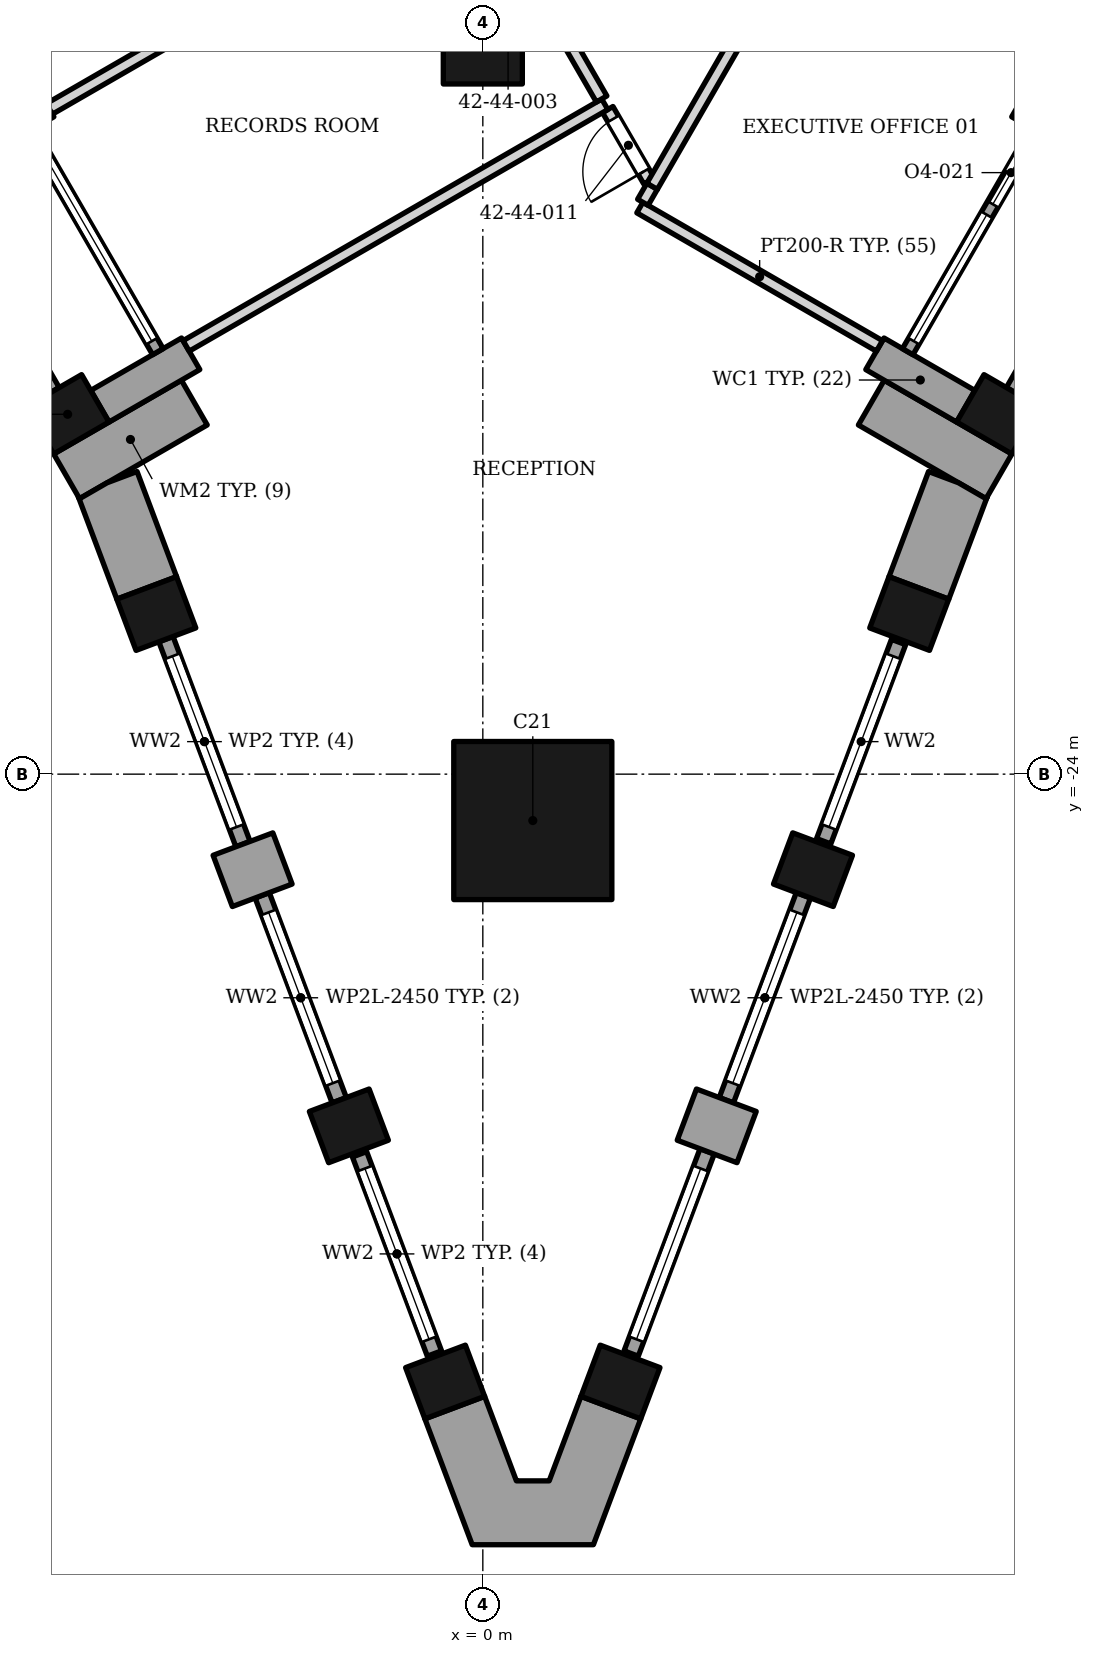
"""IFC4 building model, lengths in metres.
Left out: names, types, materials, properties, quantities, classifications, styles, units other than length and angle.
Written with IfcOpenShell. Run it as: python <this file> out.ifc"""

import sys

from ifc_helpers import new_model, si_unit, direction, frame, frame_2d, origin, origin_2d, place, context, subcontext, project, spatial, polyline, rectangle, outline, extrude, element, fill, save


model = new_model("IFC4")
c1 = context("Model", 3, precision=1e-05, world=origin(), true_north=direction((0.0, 1.0)))
c2 = subcontext(c1, "Body", "Model", "MODEL_VIEW")
j1 = project(units=[si_unit("LENGTHUNIT", "METRE"), si_unit("PLANEANGLEUNIT", "RADIAN")], contexts=[c1])
p1 = place(None, origin())
s1 = spatial("IfcSite", under=j1, at=p1, CompositionType="ELEMENT")
p2 = place(p1, origin())
s2 = spatial("IfcBuilding", under=s1, at=p2, CompositionType="ELEMENT")
p3 = place(p2, frame((0.0, 0.0, 179.7)))
s3 = spatial("IfcBuildingStorey", under=s2, at=p3, CompositionType="ELEMENT", Elevation=179.7)
p4 = place(p3, frame((0.822, -24.763, 0.0), z_axis=(0.0, 0.0, 1.0), x_axis=(0.0, 1.0, 0.0)))
e1 = element("IfcColumn", 1, at=p4, inside=s3, PredefinedType="COLUMN", context=c2, shape_type="SweptSolid", body=[
    extrude(rectangle(XDim=2.6, YDim=2.6, at=origin_2d()), origin(), (0.0, 0.0, 1.0), 3.9),
])
p5 = place(p3, frame((0.0, -12.0, 0.0), z_axis=(0.0, 0.0, 1.0), x_axis=(1.0, 0.0, 0.0)))
e2 = element("IfcColumn", 2, at=p5, inside=s3, PredefinedType="COLUMN", context=c2, shape_type="SweptSolid", body=[
    extrude(rectangle(XDim=1.3, YDim=1.3, at=origin_2d()), origin(), (0.0, 0.0, 1.0), 3.9),
])
for number, where, z_axis, x_axis in (
    (3, (-6.828, -18.082, 0.0), (0.0, 0.0, 1.0), (0.5, -0.866, 0.0)),
    (4, (-5.37, -21.359, 0.0), (0.0, 0.0, 1.0), (0.352, -0.936, 0.0)),
    (5, (-2.203, -29.784, 0.0), (0.0, 0.0, 1.0), (0.352, -0.936, 0.0)),
    (6, (-0.62, -33.996, 0.0), (0.0, 0.0, 1.0), (0.352, -0.936, 0.0)),
    (7, (2.264, -33.996, 0.0), (0.0, 0.0, 1.0), (0.352, 0.936, 0.0)),
    (8, (5.43, -25.571, 0.0), (0.0, 0.0, 1.0), (0.352, 0.936, 0.0)),
    (9, (7.013, -21.359, 0.0), (0.0, 0.0, 1.0), (0.352, 0.936, 0.0)),
    (10, (8.472, -18.082, 0.0), (0.0, 0.0, 1.0), (0.5, 0.866, 0.0)),
):
    element("IfcColumn", number, at=place(p3, frame(where, z_axis=z_axis, x_axis=x_axis)), inside=s3, PredefinedType="COLUMN", context=c2, shape_type="SweptSolid", body=[
        extrude(rectangle(XDim=0.9, YDim=1.05, at=origin_2d()), origin(), (0.0, 0.0, 1.0), 3.9),
    ])
p6 = place(p3, frame((-8.623, -13.923, 0.0), z_axis=(0.0, 0.0, 1.0), x_axis=(0.866013532718, 0.500020560727, 0.0)))
e11 = element("IfcWall", 11, at=p6, inside=s3, PredefinedType="SOLIDWALL", context=c2, shape_type="SweptSolid", body=[
    extrude(rectangle(XDim=1.725, YDim=0.3, at=frame_2d((0.863, 0.0))), origin(), (0.0, 0.0, 1.0), 3.0),
])
p7 = place(p3, frame((-4.804, -17.087, 0.0), z_axis=(0.0, 0.0, 1.0), x_axis=(-0.866013532718, -0.500020560727, 0.0)))
e12 = element("IfcWall", 12, at=p7, inside=s3, PredefinedType="SOLIDWALL", context=c2, shape_type="SweptSolid", body=[
    extrude(rectangle(XDim=1.725, YDim=0.6, at=frame_2d((0.863, 0.0))), origin(), (0.0, 0.0, 1.0), 3.0),
])
p8 = place(p3, frame((-8.853, -14.575, 0.0), z_axis=(0.0, 0.0, 1.0), x_axis=(0.500012057535, -0.866018442252, 0.0)))
e13 = element("IfcWall", 13, at=p8, inside=s3, PredefinedType="SOLIDWALL", context=c2, shape_type="SweptSolid", body=[
    extrude(rectangle(XDim=3.6, YDim=0.2, at=frame_2d((1.8, 0.0))), origin(), (0.0, 0.0, 1.0), 3.0),
])
p9 = place(p3, frame((-7.444, -13.415, 0.0), z_axis=(0.0, 0.0, 1.0), x_axis=(0.49998411664, -0.866034573852, 0.0)))
e14 = element("IfcWall", 14, at=p9, inside=s3, PredefinedType="ELEMENTEDWALL", context=c2, shape_type="SweptSolid", body=[
    extrude(rectangle(XDim=4.2, YDim=0.2, at=frame_2d((2.1, 0.0))), origin(), (0.0, 0.0, 1.0), 3.0),
])
p10 = place(p9, frame((0.2, 0.0, 0.45)))
e15 = element("IfcOpeningElement", 15, at=p10, cuts=e14, PredefinedType="OPENING", context=c2, shape_type="SweptSolid", body=[
    extrude(rectangle(XDim=3.8, YDim=2.25, at=frame_2d((1.9, 1.125))), frame((0.0, 0.11, 0.0), z_axis=(0.0, -1.0, 0.0), x_axis=(1.0, 0.0, 0.0)), (0.0, 0.0, 1.0), 0.22),
])
p11 = place(p3, frame((7.942, -17.95, 0.0), z_axis=(0.0, 0.0, 1.0), x_axis=(-0.866013532718, 0.500020560727, 0.0)))
e16 = element("IfcWall", 16, at=p11, inside=s3, PredefinedType="SOLIDWALL", context=c2, shape_type="SweptSolid", body=[
    extrude(rectangle(XDim=1.725, YDim=0.6, at=frame_2d((0.863, 0.0))), origin(), (0.0, 0.0, 1.0), 3.0),
])
p12 = place(p3, frame((10.267, -13.923, 0.0), z_axis=(0.0, 0.0, 1.0), x_axis=(-0.866013532718, 0.500020560727, 0.0)))
e17 = element("IfcWall", 17, at=p12, inside=s3, PredefinedType="SOLIDWALL", context=c2, shape_type="SweptSolid", body=[
    extrude(rectangle(XDim=1.725, YDim=0.3, at=frame_2d((0.863, 0.0))), origin(), (0.0, 0.0, 1.0), 3.0),
])
p13 = place(p3, frame((8.697, -17.693, 0.0), z_axis=(0.0, 0.0, 1.0), x_axis=(0.499961193289, 0.866047807691, 0.0)))
e18 = element("IfcWall", 18, at=p13, inside=s3, PredefinedType="SOLIDWALL", context=c2, shape_type="SweptSolid", body=[
    extrude(rectangle(XDim=3.6, YDim=0.2, at=frame_2d((1.8, 0.0))), origin(), (0.0, 0.0, 1.0), 3.0),
])
p14 = place(p3, frame((6.988, -17.052, 0.0), z_axis=(0.0, 0.0, 1.0), x_axis=(0.500027713859, 0.866009402589, 0.0)))
e19 = element("IfcWall", 19, at=p14, inside=s3, PredefinedType="ELEMENTEDWALL", context=c2, shape_type="SweptSolid", body=[
    extrude(rectangle(XDim=4.2, YDim=0.2, at=frame_2d((2.1, 0.0))), origin(), (0.0, 0.0, 1.0), 3.0),
])
p15 = place(p14, frame((0.2, 0.0, 0.45)))
e20 = element("IfcOpeningElement", 20, at=p15, cuts=e19, PredefinedType="OPENING", context=c2, shape_type="SweptSolid", body=[
    extrude(rectangle(XDim=2.4, YDim=2.25, at=frame_2d((1.2, 1.125))), frame((0.0, 0.11, 0.0), z_axis=(0.0, -1.0, 0.0), x_axis=(1.0, 0.0, 0.0)), (0.0, 0.0, 1.0), 0.22),
])
p16 = place(p14, frame((2.8, 0.0, 0.0)))
e21 = element("IfcOpeningElement", 21, at=p16, cuts=e19, PredefinedType="OPENING", context=c2, shape_type="SweptSolid", body=[
    extrude(rectangle(XDim=1.2, YDim=2.7, at=frame_2d((0.6, 1.35))), frame((0.0, 0.11, 0.0), z_axis=(0.0, -1.0, 0.0), x_axis=(1.0, 0.0, 0.0)), (0.0, 0.0, 1.0), 0.22),
])
for number, where, z_axis, x_axis in (
    (22, (-6.845, -19.102, 0.0), (0.0, 0.0, 1.0), (0.866, 0.5, 0.0)),
    (23, (8.489, -19.102, 0.0), (0.0, 0.0, 1.0), (-0.866, 0.5, 0.0)),
):
    element("IfcWall", number, at=place(p3, frame(where, z_axis=z_axis, x_axis=x_axis)), inside=s3, PredefinedType="SOLIDWALL", context=c2, shape_type="SweptSolid", body=[
        extrude(rectangle(XDim=2.425, YDim=0.85, at=frame_2d((1.212, 0.0))), origin(), (0.0, 0.0, 1.0), 3.0),
    ])
p17 = place(p3, frame((-3.295, -25.387, 0.0), z_axis=(0.0, 0.0, 1.0), x_axis=(-0.936080509118, -0.351785844584, 0.0)))
e24 = element("IfcWall", 24, at=p17, inside=s3, PredefinedType="SOLIDWALL", context=c2, shape_type="SweptSolid", body=[
    extrude(rectangle(XDim=1.05, YDim=0.9, at=frame_2d((0.525, 0.0))), origin(), (0.0, 0.0, 1.0), 2.95),
])
p18 = place(p3, frame((-5.211, -21.78, 0.0), z_axis=(0.0, 0.0, 1.0), x_axis=(0.351769947693, -0.936086483131, 0.0)))
e25 = element("IfcWall", 25, at=p18, inside=s3, PredefinedType="ELEMENTEDWALL", context=c2, shape_type="SweptSolid", body=[
    extrude(rectangle(XDim=3.6, YDim=0.25, at=frame_2d((1.8, 0.0))), origin(), (0.0, 0.0, 1.0), 3.0),
])
p19 = place(p18, frame((0.3, 0.0, 0.3)))
e26 = element("IfcOpeningElement", 26, at=p19, cuts=e25, PredefinedType="OPENING", context=c2, shape_type="SweptSolid", body=[
    extrude(rectangle(XDim=3.0, YDim=2.5, at=frame_2d((1.5, 1.25))), frame((0.0, 0.135, 0.0), z_axis=(0.0, -1.0, 0.0), x_axis=(1.0, 0.0, 0.0)), (0.0, 0.0, 1.0), 0.27),
])
p20 = place(p3, frame((-3.628, -25.993, 0.0), z_axis=(0.0, 0.0, 1.0), x_axis=(0.351829371284, -0.936064150314, 0.0)))
e27 = element("IfcWall", 27, at=p20, inside=s3, PredefinedType="ELEMENTEDWALL", context=c2, shape_type="SweptSolid", body=[
    extrude(rectangle(XDim=3.6, YDim=0.25, at=frame_2d((1.8, 0.0))), origin(), (0.0, 0.0, 1.0), 2.95),
])
p21 = place(p20, frame((0.3, 0.0, 0.3)))
e28 = element("IfcOpeningElement", 28, at=p21, cuts=e27, PredefinedType="OPENING", context=c2, shape_type="SweptSolid", body=[
    extrude(rectangle(XDim=3.0, YDim=2.45, at=frame_2d((1.5, 1.225))), frame((0.0, 0.135, 0.0), z_axis=(0.0, -1.0, 0.0), x_axis=(1.0, 0.0, 0.0)), (0.0, 0.0, 1.0), 0.27),
])
p22 = place(p3, frame((-2.027, -30.252, 0.0), z_axis=(0.0, 0.0, 1.0), x_axis=(0.351849563443, -0.936056560634, 0.0)))
e29 = element("IfcWall", 29, at=p22, inside=s3, PredefinedType="ELEMENTEDWALL", context=c2, shape_type="SweptSolid", body=[
    extrude(rectangle(XDim=3.5, YDim=0.25, at=frame_2d((1.75, 0.0))), origin(), (0.0, 0.0, 1.0), 3.0),
])
p23 = place(p22, frame((0.25, 0.0, 0.3)))
e30 = element("IfcOpeningElement", 30, at=p23, cuts=e29, PredefinedType="OPENING", context=c2, shape_type="SweptSolid", body=[
    extrude(rectangle(XDim=3.0, YDim=2.5, at=frame_2d((1.5, 1.25))), frame((0.0, 0.135, 0.0), z_axis=(0.0, -1.0, 0.0), x_axis=(1.0, 0.0, 0.0)), (0.0, 0.0, 1.0), 0.27),
])
p24 = place(p3, frame((3.355, -29.599, 0.0), z_axis=(0.0, 0.0, 1.0), x_axis=(0.936003928089, -0.351989554676, 0.0)))
e31 = element("IfcWall", 31, at=p24, inside=s3, PredefinedType="SOLIDWALL", context=c2, shape_type="SweptSolid", body=[
    extrude(rectangle(XDim=1.05, YDim=0.9, at=frame_2d((0.525, 0.0))), origin(), (0.0, 0.0, 1.0), 3.0),
])
p25 = place(p3, frame((2.44, -33.528, 0.0), z_axis=(0.0, 0.0, 1.0), x_axis=(0.351778678894, 0.936083202005, 0.0)))
e32 = element("IfcWall", 32, at=p25, inside=s3, PredefinedType="ELEMENTEDWALL", context=c2, shape_type="SweptSolid", body=[
    extrude(rectangle(XDim=3.552, YDim=0.25, at=frame_2d((1.776, 0.0))), origin(), (0.0, 0.0, 1.0), 3.0),
])
p26 = place(p25, frame((0.25, 0.0, 0.3)))
e33 = element("IfcOpeningElement", 33, at=p26, cuts=e32, PredefinedType="OPENING", context=c2, shape_type="SweptSolid", body=[
    extrude(rectangle(XDim=3.0, YDim=2.5, at=frame_2d((1.5, 1.25))), frame((0.0, 0.135, 0.0), z_axis=(0.0, -1.0, 0.0), x_axis=(1.0, 0.0, 0.0)), (0.0, 0.0, 1.0), 0.27),
])
p27 = place(p3, frame((4.005, -29.363, 0.0), z_axis=(0.0, 0.0, 1.0), x_axis=(0.351829371284, 0.936064150314, 0.0)))
e34 = element("IfcWall", 34, at=p27, inside=s3, PredefinedType="ELEMENTEDWALL", context=c2, shape_type="SweptSolid", body=[
    extrude(rectangle(XDim=3.6, YDim=0.25, at=frame_2d((1.8, 0.0))), origin(), (0.0, 0.0, 1.0), 2.95),
])
p28 = place(p27, frame((0.3, 0.0, 0.3)))
e35 = element("IfcOpeningElement", 35, at=p28, cuts=e34, PredefinedType="OPENING", context=c2, shape_type="SweptSolid", body=[
    extrude(rectangle(XDim=3.0, YDim=2.45, at=frame_2d((1.5, 1.225))), frame((0.0, 0.135, 0.0), z_axis=(0.0, -1.0, 0.0), x_axis=(1.0, 0.0, 0.0)), (0.0, 0.0, 1.0), 0.27),
])
p29 = place(p3, frame((5.606, -25.103, 0.0), z_axis=(0.0, 0.0, 1.0), x_axis=(0.351849563443, 0.936056560634, 0.0)))
e36 = element("IfcWall", 36, at=p29, inside=s3, PredefinedType="ELEMENTEDWALL", context=c2, shape_type="SweptSolid", body=[
    extrude(rectangle(XDim=3.5, YDim=0.25, at=frame_2d((1.75, 0.0))), origin(), (0.0, 0.0, 1.0), 3.0),
])
p30 = place(p29, frame((0.25, 0.0, 0.3)))
e37 = element("IfcOpeningElement", 37, at=p30, cuts=e36, PredefinedType="OPENING", context=c2, shape_type="SweptSolid", body=[
    extrude(rectangle(XDim=3.0, YDim=2.5, at=frame_2d((1.5, 1.25))), frame((0.0, 0.135, 0.0), z_axis=(0.0, -1.0, 0.0), x_axis=(1.0, 0.0, 0.0)), (0.0, 0.0, 1.0), 0.27),
])
p31 = place(p3, origin())
e38 = element("IfcWall", 38, at=p31, inside=s3, PredefinedType="SOLIDWALL", context=c2, shape_type="SweptSolid", body=[
    extrude(outline(polyline([(-5.036, -20.753), (-5.687, -19.023), (-6.178, -19.208), (-6.633, -19.47), (-6.654, -19.433), (-6.02, -21.122), (-5.037, -20.753), (-5.037, -20.753), (-5.036, -20.753)])), origin(), (0.0, 0.0, 1.0), 3.0),
])
p32 = place(p3, origin())
e39 = element("IfcWall", 39, at=p32, inside=s3, PredefinedType="SOLIDWALL", context=c2, shape_type="SweptSolid", body=[
    extrude(outline(polyline([(0.552, -35.622), (0.03, -34.232), (-0.953, -34.602), (-0.175, -36.672), (1.819, -36.672), (2.597, -34.602), (1.614, -34.232), (1.092, -35.622), (0.552, -35.622)])), origin(), (0.0, 0.0, 1.0), 3.0),
])
p33 = place(p3, origin())
e40 = element("IfcWall", 40, at=p33, inside=s3, PredefinedType="SOLIDWALL", context=c2, shape_type="SweptSolid", body=[
    extrude(outline(polyline([(7.33, -19.023), (6.68, -20.753), (7.663, -21.123), (8.298, -19.433), (8.277, -19.47), (7.822, -19.208), (7.33, -19.023)])), origin(), (0.0, 0.0, 1.0), 3.0),
])
p34 = place(p3, frame((2.583, -14.683, 0.0), z_axis=(0.0, 0.0, 1.0), x_axis=(0.866012237902, -0.500022803284, 0.0)))
e41 = element("IfcWall", 41, at=p34, inside=s3, PredefinedType="PARTITIONING", context=c2, shape_type="SweptSolid", body=[
    extrude(rectangle(XDim=4.55, YDim=0.2, at=frame_2d((2.275, 0.0))), origin(), (0.0, 0.0, 1.0), 2.884),
])
p35 = place(p3, frame((2.632, -14.596, 0.0), z_axis=(0.0, 0.0, 1.0), x_axis=(0.499074005857, 0.866559367082, 0.0)))
e42 = element("IfcWall", 42, at=p35, inside=s3, PredefinedType="PARTITIONING", context=c2, shape_type="SweptSolid", body=[
    extrude(rectangle(XDim=0.304, YDim=0.2, at=frame_2d((0.152, 0.0))), origin(), (0.0, 0.0, 1.0), 3.73),
])
p36 = place(p3, frame((2.054, -13.07, 0.0), z_axis=(0.0, 0.0, 1.0), x_axis=(0.500759821175, -0.865586276172, 0.0)))
e43 = element("IfcWall", 43, at=p36, inside=s3, PredefinedType="PARTITIONING", context=c2, shape_type="SweptSolid", body=[
    extrude(rectangle(XDim=1.358, YDim=0.2, at=frame_2d((0.679, 0.0))), origin(), (0.0, 0.0, 1.0), 2.884),
])
p37 = place(p36, frame((0.179, 0.0, 0.0)))
e44 = element("IfcOpeningElement", 44, at=p37, cuts=e43, PredefinedType="OPENING", context=c2, shape_type="SweptSolid", body=[
    extrude(rectangle(XDim=1.0, YDim=2.1, at=frame_2d((0.5, 1.05))), frame((0.0, 0.11, 0.0), z_axis=(0.0, -1.0, 0.0), x_axis=(1.0, 0.0, 0.0)), (0.0, 0.0, 1.0), 0.22),
])
p38 = place(p3, frame((-7.129, -13.06, 0.0), z_axis=(0.0, 0.0, 1.0), x_axis=(0.866135346495, 0.499809525271, 0.0)))
e45 = element("IfcWall", 45, at=p38, inside=s3, PredefinedType="PARTITIONING", context=c2, shape_type="SweptSolid", body=[
    extrude(rectangle(XDim=7.848, YDim=0.2, at=frame_2d((3.924, 0.0))), origin(), (0.0, 0.0, 1.0), 2.742),
])
p39 = place(p3, frame((-4.879, -16.958, 0.0), z_axis=(0.0, 0.0, 1.0), x_axis=(0.866110929286, 0.499851836219, 0.0)))
e46 = element("IfcWall", 46, at=p39, inside=s3, PredefinedType="PARTITIONING", context=c2, shape_type="SweptSolid", body=[
    extrude(rectangle(XDim=7.95, YDim=0.2, at=frame_2d((3.975, 0.0))), origin(), (0.0, 0.0, 1.0), 2.884),
])
p40 = place(p3, frame((-0.245, -9.088, 0.0), z_axis=(0.0, 0.0, 1.0), x_axis=(0.500013981145, -0.866017331616, 0.0)))
e47 = element("IfcWall", 47, at=p40, inside=s3, PredefinedType="PARTITIONING", context=c2, shape_type="SweptSolid", body=[
    extrude(rectangle(XDim=4.398, YDim=0.2, at=frame_2d((2.199, 0.0))), origin(), (0.0, 0.0, 1.0), 2.742),
])
p41 = place(p40, frame((0.871, 0.0, 0.0)))
e48 = element("IfcOpeningElement", 48, at=p41, cuts=e47, PredefinedType="OPENING", context=c2, shape_type="SweptSolid", body=[
    extrude(rectangle(XDim=0.9, YDim=2.1, at=frame_2d((0.45, 1.05))), frame((0.0, 0.11, 0.0), z_axis=(0.0, -1.0, 0.0), x_axis=(1.0, 0.0, 0.0)), (0.0, 0.0, 1.0), 0.22),
])
p42 = place(p3, frame((2.784, -14.333, 0.0), z_axis=(0.0, 0.0, 1.0), x_axis=(0.500204257301, 0.865907443656, 0.0)))
e49 = element("IfcWall", 49, at=p42, inside=s3, PredefinedType="PARTITIONING", context=c2, shape_type="SweptSolid", body=[
    extrude(rectangle(XDim=8.597, YDim=0.2, at=frame_2d((4.298, 0.0))), origin(), (0.0, 0.0, 1.0), 2.742),
])
p43 = place(p42, frame((3.799, 0.0, 0.0)))
e50 = element("IfcOpeningElement", 50, at=p43, cuts=e49, PredefinedType="OPENING", context=c2, shape_type="SweptSolid", body=[
    extrude(rectangle(XDim=1.0, YDim=2.4, at=frame_2d((0.5, 1.2))), frame((0.0, 0.11, 0.0), z_axis=(0.0, -1.0, 0.0), x_axis=(1.0, 0.0, 0.0)), (0.0, 0.0, 1.0), 0.22),
])
p44 = place(p10, origin())
e51 = element("IfcWindow", 51, at=p44, inside=s3, PartitioningType="SINGLE_PANEL", PredefinedType="WINDOW", context=c2, shape_type="SweptSolid", body=[
    extrude(rectangle(XDim=3.8, YDim=2.25, at=frame_2d((1.9, 1.125))), frame((0.0, 0.03, 0.0), z_axis=(0.0, -1.0, 0.0), x_axis=(1.0, 0.0, 0.0)), (0.0, 0.0, 1.0), 0.06),
])
fill(e15, e51)
p45 = place(p15, origin())
e52 = element("IfcWindow", 52, at=p45, inside=s3, PartitioningType="SINGLE_PANEL", PredefinedType="WINDOW", context=c2, shape_type="SweptSolid", body=[
    extrude(rectangle(XDim=2.4, YDim=2.25, at=frame_2d((1.2, 1.125))), frame((0.0, 0.03, 0.0), z_axis=(0.0, -1.0, 0.0), x_axis=(1.0, 0.0, 0.0)), (0.0, 0.0, 1.0), 0.06),
])
fill(e20, e52)
p46 = place(p16, origin())
e53 = element("IfcDoor", 53, at=p46, inside=s3, OperationType="SINGLE_SWING_LEFT", PredefinedType="DOOR", context=c2, shape_type="SweptSolid", body=[
    extrude(rectangle(XDim=1.2, YDim=2.7, at=frame_2d((0.6, 1.35))), frame((0.0, 0.025, 0.0), z_axis=(0.0, -1.0, 0.0), x_axis=(1.0, 0.0, 0.0)), (0.0, 0.0, 1.0), 0.05),
])
fill(e21, e53)
p47 = place(p19, origin())
e54 = element("IfcWindow", 54, at=p47, inside=s3, PartitioningType="SINGLE_PANEL", PredefinedType="WINDOW", context=c2, shape_type="SweptSolid", body=[
    extrude(rectangle(XDim=3.0, YDim=2.5, at=frame_2d((1.5, 1.25))), frame((0.0, 0.03, 0.0), z_axis=(0.0, -1.0, 0.0), x_axis=(1.0, 0.0, 0.0)), (0.0, 0.0, 1.0), 0.06),
])
fill(e26, e54)
p48 = place(p21, origin())
e55 = element("IfcWindow", 55, at=p48, inside=s3, PartitioningType="SINGLE_PANEL", PredefinedType="WINDOW", context=c2, shape_type="SweptSolid", body=[
    extrude(rectangle(XDim=3.0, YDim=2.45, at=frame_2d((1.5, 1.225))), frame((0.0, 0.03, 0.0), z_axis=(0.0, -1.0, 0.0), x_axis=(1.0, 0.0, 0.0)), (0.0, 0.0, 1.0), 0.06),
])
fill(e28, e55)
p49 = place(p23, origin())
e56 = element("IfcWindow", 56, at=p49, inside=s3, PartitioningType="SINGLE_PANEL", PredefinedType="WINDOW", context=c2, shape_type="SweptSolid", body=[
    extrude(rectangle(XDim=3.0, YDim=2.5, at=frame_2d((1.5, 1.25))), frame((0.0, 0.03, 0.0), z_axis=(0.0, -1.0, 0.0), x_axis=(1.0, 0.0, 0.0)), (0.0, 0.0, 1.0), 0.06),
])
fill(e30, e56)
p50 = place(p26, origin())
e57 = element("IfcWindow", 57, at=p50, inside=s3, PartitioningType="SINGLE_PANEL", PredefinedType="WINDOW", context=c2, shape_type="SweptSolid", body=[
    extrude(rectangle(XDim=3.0, YDim=2.5, at=frame_2d((1.5, 1.25))), frame((0.0, 0.03, 0.0), z_axis=(0.0, -1.0, 0.0), x_axis=(1.0, 0.0, 0.0)), (0.0, 0.0, 1.0), 0.06),
])
fill(e33, e57)
p51 = place(p28, origin())
e58 = element("IfcWindow", 58, at=p51, inside=s3, PartitioningType="SINGLE_PANEL", PredefinedType="WINDOW", context=c2, shape_type="SweptSolid", body=[
    extrude(rectangle(XDim=3.0, YDim=2.45, at=frame_2d((1.5, 1.225))), frame((0.0, 0.03, 0.0), z_axis=(0.0, -1.0, 0.0), x_axis=(1.0, 0.0, 0.0)), (0.0, 0.0, 1.0), 0.06),
])
fill(e35, e58)
p52 = place(p30, origin())
e59 = element("IfcWindow", 59, at=p52, inside=s3, PartitioningType="SINGLE_PANEL", PredefinedType="WINDOW", context=c2, shape_type="SweptSolid", body=[
    extrude(rectangle(XDim=3.0, YDim=2.5, at=frame_2d((1.5, 1.25))), frame((0.0, 0.03, 0.0), z_axis=(0.0, -1.0, 0.0), x_axis=(1.0, 0.0, 0.0)), (0.0, 0.0, 1.0), 0.06),
])
fill(e37, e59)
p53 = place(p37, origin())
e60 = element("IfcDoor", 60, at=p53, inside=s3, OperationType="SINGLE_SWING_RIGHT", PredefinedType="DOOR", context=c2, shape_type="SweptSolid", body=[
    extrude(rectangle(XDim=1.0, YDim=2.1, at=frame_2d((0.5, 1.05))), frame((0.0, 0.025, 0.0), z_axis=(0.0, -1.0, 0.0), x_axis=(1.0, 0.0, 0.0)), (0.0, 0.0, 1.0), 0.05),
])
fill(e44, e60)
save(model, sys.argv[1])
